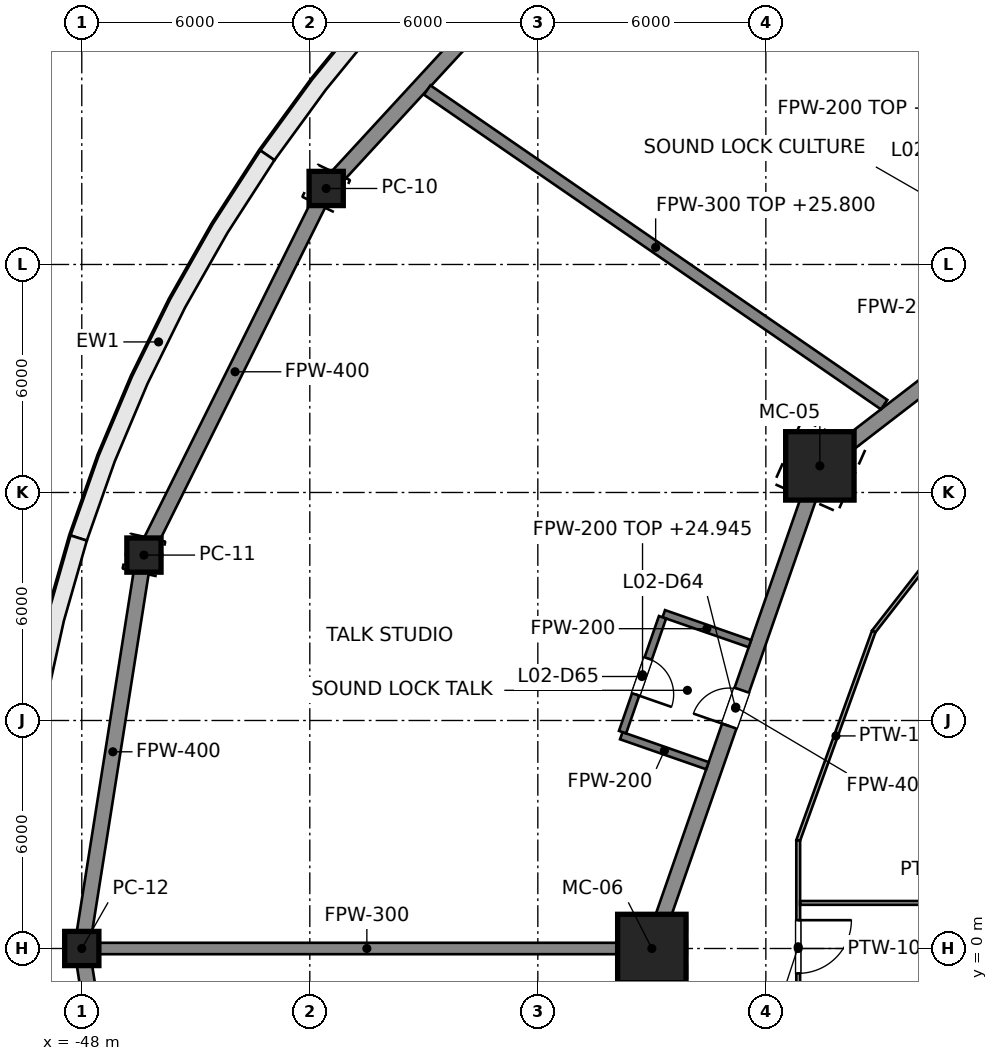
"""IFC4 building model, lengths in metres.
Left out: names, types, materials, properties, quantities, classifications, styles, units other than length and angle.
Written with IfcOpenShell. Run it as: python <this file> out.ifc"""

import sys

from ifc_helpers import new_model, si_unit, direction, frame, frame_2d, origin, origin_2d, place, context, subcontext, project, spatial, polyline, rectangle, hollow_rectangle, outline, extrude, element, fill, save


model = new_model("IFC4")
c1 = context("Model", 3, precision=1e-05, world=origin(), true_north=direction((0.0, 1.0)))
c2 = subcontext(c1, "Body", "Model", "MODEL_VIEW")
j1 = project(units=[si_unit("LENGTHUNIT", "METRE"), si_unit("PLANEANGLEUNIT", "RADIAN")], contexts=[c1])
p1 = place(None, origin())
s1 = spatial("IfcSite", under=j1, at=p1, CompositionType="ELEMENT")
p2 = place(p1, origin())
s2 = spatial("IfcBuilding", under=s1, at=p2, CompositionType="ELEMENT")
p3 = place(p2, frame((0.0, 0.0, 17.0)))
s3 = spatial("IfcBuildingStorey", under=s2, at=p3, CompositionType="ELEMENT", Elevation=17.0)
for number, where, z_axis, x_axis in (
    (1, (-28.579, 12.7, 0.0), (0.0, 0.0, 1.0), (-0.914, 0.406, 0.0)),
    (2, (-33.0, 0.0, 0.0), (0.0, 0.0, 1.0), (-1.0, 0.0, 0.0)),
):
    element("IfcColumn", number, at=place(p3, frame(where, z_axis=z_axis, x_axis=x_axis)), inside=s3, PredefinedType="COLUMN", context=c2, shape_type="SweptSolid", body=[
        extrude(hollow_rectangle(XDim=1.8, YDim=1.8, WallThickness=0.08, at=origin_2d()), origin(), (0.0, 0.0, 1.0), 9.0),
    ])
for number, where, z_axis, x_axis in (
    (3, (-41.569, 20.0, 0.0), (0.0, 0.0, 1.0), (-0.901, 0.434, 0.0)),
    (4, (-46.365, 10.353, 0.0), (0.0, 0.0, 1.0), (-0.976, 0.218, 0.0)),
    (5, (-48.0, 0.0, 0.0), (0.0, 0.0, 1.0), (-1.0, 0.0, 0.0)),
):
    element("IfcColumn", number, at=place(p3, frame(where, z_axis=z_axis, x_axis=x_axis)), inside=s3, PredefinedType="COLUMN", context=c2, shape_type="SweptSolid", body=[
        extrude(hollow_rectangle(XDim=0.9, YDim=0.9, WallThickness=0.04, at=origin_2d()), origin(), (0.0, 0.0, 1.0), 9.0),
    ])
p4 = place(p3, origin())
e6 = element("IfcWall", 6, at=p4, inside=s3, PredefinedType="SOLIDWALL", context=c2, shape_type="SweptSolid", body=[
    extrude(outline(polyline([(-35.355, 29.698), (-37.157, 28.104), (-38.857, 26.431), (-40.451, 24.687), (-41.934, 22.875), (-43.301, 21.0), (-42.93, 20.745), (-41.577, 22.6), (-40.11, 24.393), (-38.533, 26.119), (-36.85, 27.774), (-35.066, 29.354), (-35.355, 29.698)])), origin(), (0.0, 0.0, 1.0), 8.8),
])
e7 = element("IfcWall", 7, at=p4, inside=s3, PredefinedType="SOLIDWALL", context=c2, shape_type="SweptSolid", body=[
    extrude(outline(polyline([(-43.301, 21.0), (-44.55, 19.068), (-45.677, 17.083), (-46.679, 15.052), (-47.553, 12.979), (-48.296, 10.87), (-47.868, 10.734), (-47.133, 12.816), (-46.27, 14.865), (-45.28, 16.872), (-44.166, 18.834), (-42.93, 20.745), (-43.301, 21.0)])), origin(), (0.0, 0.0, 1.0), 8.8),
])
e8 = element("IfcWall", 8, at=p4, inside=s3, PredefinedType="SOLIDWALL", context=c2, shape_type="SweptSolid", body=[
    extrude(outline(polyline([(-48.296, 10.87), (-48.907, 8.732), (-49.385, 6.57), (-49.726, 4.39), (-49.931, 2.198), (-50.0, 0.0), (-49.55, 0.0), (-49.482, 2.17), (-49.28, 4.334), (-48.942, 6.487), (-48.471, 8.622), (-47.868, 10.734), (-48.296, 10.87)])), origin(), (0.0, 0.0, 1.0), 8.8),
])
e9 = element("IfcWall", 9, at=p4, inside=s3, PredefinedType="SOLIDWALL", context=c2, shape_type="SweptSolid", body=[
    extrude(outline(polyline([(-50.0, 0.0), (-49.931, -2.198), (-49.726, -4.39), (-49.385, -6.57), (-48.907, -8.732), (-48.296, -10.87), (-47.868, -10.734), (-48.471, -8.622), (-48.942, -6.487), (-49.28, -4.334), (-49.482, -2.17), (-49.55, 0.0), (-50.0, 0.0)])), origin(), (0.0, 0.0, 1.0), 8.8),
])
p5 = place(p3, frame((-33.941, 28.284, 0.0), z_axis=(0.0, 0.0, 1.0), x_axis=(-0.67736833065, -0.735644033914, 0.0)))
e10 = element("IfcWall", 10, at=p5, inside=s3, PredefinedType="PARTITIONING", context=c2, shape_type="SweptSolid", body=[
    extrude(rectangle(XDim=11.261, YDim=0.4, at=frame_2d((5.631, 0.0))), origin(), (0.0, 0.0, 1.0), 7.877),
])
p6 = place(p3, frame((-41.569, 20.0, 0.0), z_axis=(0.0, 0.0, 1.0), x_axis=(-0.445118441463, -0.895471704226, 0.0)))
e11 = element("IfcWall", 11, at=p6, inside=s3, PredefinedType="PARTITIONING", context=c2, shape_type="SweptSolid", body=[
    extrude(rectangle(XDim=10.773, YDim=0.4, at=frame_2d((5.387, 0.0))), origin(), (0.0, 0.0, 1.0), 7.877),
])
for number, where, z_axis, x_axis in (
    (12, (-46.365, 10.353, 0.0), (0.0, 0.0, 1.0), (-0.156, -0.988, 0.0)),
    (13, (-48.0, 0.0, 0.0), (0.0, 0.0, 1.0), (0.156, -0.988, 0.0)),
):
    element("IfcWall", number, at=place(p3, frame(where, z_axis=z_axis, x_axis=x_axis)), inside=s3, PredefinedType="PARTITIONING", context=c2, shape_type="SweptSolid", body=[
        extrude(rectangle(XDim=10.481, YDim=0.4, at=frame_2d((5.241, 0.0))), origin(), (0.0, 0.0, 1.0), 7.877),
    ])
p7 = place(p3, frame((-16.5, 21.997, 0.0), z_axis=(0.0, 0.0, 1.0), x_axis=(-0.792443539308, -0.609945273782, 0.0)))
e14 = element("IfcWall", 14, at=p7, inside=s3, PredefinedType="PARTITIONING", context=c2, shape_type="SweptSolid", body=[
    extrude(rectangle(XDim=15.242, YDim=0.4, at=frame_2d((7.621, 0.0))), origin(), (0.0, 0.0, 1.0), 7.868),
])
p8 = place(p7, frame((7.15, 0.0, 0.0)))
e15 = element("IfcOpeningElement", 15, at=p8, cuts=e14, PredefinedType="OPENING", context=c2, shape_type="SweptSolid", body=[
    extrude(rectangle(XDim=1.0, YDim=2.1, at=frame_2d((0.5, 1.05))), frame((0.0, 0.2, 0.0), z_axis=(0.0, -1.0, 0.0), x_axis=(1.0, 0.0, 0.0)), (0.0, 0.0, 1.0), 0.4),
])
p9 = place(p3, frame((-28.579, 12.7, 0.0), z_axis=(0.0, 0.0, 1.0), x_axis=(-0.328770590399, -0.944409815117, 0.0)))
e16 = element("IfcWall", 16, at=p9, inside=s3, PredefinedType="PARTITIONING", context=c2, shape_type="SweptSolid", body=[
    extrude(rectangle(XDim=13.448, YDim=0.4, at=frame_2d((6.724, 0.0))), origin(), (0.0, 0.0, 1.0), 7.868),
])
p10 = place(p9, frame((6.25, 0.0, 0.0)))
e17 = element("IfcOpeningElement", 17, at=p10, cuts=e16, PredefinedType="OPENING", context=c2, shape_type="SweptSolid", body=[
    extrude(rectangle(XDim=1.0, YDim=2.1, at=frame_2d((0.5, 1.05))), frame((0.0, 0.2, 0.0), z_axis=(0.0, -1.0, 0.0), x_axis=(1.0, 0.0, 0.0)), (0.0, 0.0, 1.0), 0.4),
])
p11 = place(p3, frame((-33.0, 0.0, 0.0), z_axis=(0.0, 0.0, 1.0), x_axis=(0.328770590399, -0.944409815117, 0.0)))
e18 = element("IfcWall", 18, at=p11, inside=s3, PredefinedType="PARTITIONING", context=c2, shape_type="SweptSolid", body=[
    extrude(rectangle(XDim=13.448, YDim=0.4, at=frame_2d((6.724, 0.0))), origin(), (0.0, 0.0, 1.0), 7.868),
])
p12 = place(p11, frame((6.25, 0.0, 0.0)))
e19 = element("IfcOpeningElement", 19, at=p12, cuts=e18, PredefinedType="OPENING", context=c2, shape_type="SweptSolid", body=[
    extrude(rectangle(XDim=1.0, YDim=2.1, at=frame_2d((0.5, 1.05))), frame((0.0, 0.2, 0.0), z_axis=(0.0, -1.0, 0.0), x_axis=(1.0, 0.0, 0.0)), (0.0, 0.0, 1.0), 0.4),
])
p13 = place(p3, frame((-23.325, 13.271, 0.0), z_axis=(0.0, 0.0, 1.0), x_axis=(-0.614354540541, -0.78903009988, 0.0)))
e20 = element("IfcWall", 20, at=p13, inside=s3, PredefinedType="PARTITIONING", context=c2, shape_type="SweptSolid", body=[
    extrude(rectangle(XDim=6.246, YDim=0.1, at=frame_2d((3.123, 0.0))), origin(), (0.0, 0.0, 1.0), 7.945),
])
p14 = place(p3, frame((-27.162, 8.343, 0.0), z_axis=(0.0, 0.0, 1.0), x_axis=(-0.339837423604, -0.940484197378, 0.0)))
e21 = element("IfcWall", 21, at=p14, inside=s3, PredefinedType="PARTITIONING", context=c2, shape_type="SweptSolid", body=[
    extrude(rectangle(XDim=5.845, YDim=0.1, at=frame_2d((2.922, 0.0))), origin(), (0.0, 0.0, 1.0), 7.877),
])
p15 = place(p3, frame((-29.148, 2.845, 0.0), z_axis=(0.0, 0.0, 1.0), x_axis=(0.0, -1.0, 0.0)))
e22 = element("IfcWall", 22, at=p15, inside=s3, PredefinedType="PARTITIONING", context=c2, shape_type="SweptSolid", body=[
    extrude(rectangle(XDim=5.691, YDim=0.1, at=frame_2d((2.845, 0.0))), origin(), (0.0, 0.0, 1.0), 7.877),
])
p16 = place(p15, frame((2.1, 0.0, 0.0)))
e23 = element("IfcOpeningElement", 23, at=p16, cuts=e22, PredefinedType="OPENING", context=c2, shape_type="SweptSolid", body=[
    extrude(rectangle(XDim=1.4, YDim=2.1, at=frame_2d((0.7, 1.05))), frame((0.0, 0.05, 0.0), z_axis=(0.0, -1.0, 0.0), x_axis=(1.0, 0.0, 0.0)), (0.0, 0.0, 1.0), 0.1),
])
p17 = place(p3, frame((-18.05, 1.2, 0.0), z_axis=(0.0, 0.0, 1.0), x_axis=(-1.0, 0.0, 0.0)))
e24 = element("IfcWall", 24, at=p17, inside=s3, PredefinedType="PARTITIONING", context=c2, shape_type="SweptSolid", body=[
    extrude(rectangle(XDim=11.048, YDim=0.1, at=frame_2d((5.524, 0.0))), origin(), (0.0, 0.0, 1.0), 8.8),
])
p18 = place(p3, frame((-26.888, 14.312, 0.0), z_axis=(0.0, 0.0, 1.0), x_axis=(-0.823646474485, 0.567103592889, 0.0)))
e25 = element("IfcWall", 25, at=p18, inside=s3, PredefinedType="PARTITIONING", context=c2, shape_type="SweptSolid", body=[
    extrude(rectangle(XDim=14.598, YDim=0.3, at=frame_2d((7.299, 0.0))), origin(), (0.0, 0.0, 1.0), 8.8),
])
p19 = place(p3, frame((-33.2, 0.0, 0.0), z_axis=(0.0, 0.0, 1.0), x_axis=(-1.0, 0.0, 0.0)))
e26 = element("IfcWall", 26, at=p19, inside=s3, PredefinedType="PARTITIONING", context=c2, shape_type="SweptSolid", body=[
    extrude(rectangle(XDim=14.598, YDim=0.3, at=frame_2d((7.299, 0.0))), origin(), (0.0, 0.0, 1.0), 8.026),
])
for number, where, z_axis, x_axis in (
    (27, (-30.419, 8.021, 0.0), (0.0, 0.0, 1.0), (-0.944, 0.329, 0.0)),
    (28, (-31.537, 4.81, 0.0), (0.0, 0.0, 1.0), (-0.944, 0.329, 0.0)),
):
    element("IfcWall", number, at=place(p3, frame(where, z_axis=z_axis, x_axis=x_axis)), inside=s3, PredefinedType="PARTITIONING", context=c2, shape_type="SweptSolid", body=[
        extrude(rectangle(XDim=2.4, YDim=0.2, at=frame_2d((1.2, 0.0))), origin(), (0.0, 0.0, 1.0), 8.8),
    ])
p20 = place(p3, frame((-32.719, 8.716, 0.0), z_axis=(0.0, 0.0, 1.0), x_axis=(-0.328742544754, -0.944419577978, 0.0)))
e29 = element("IfcWall", 29, at=p20, inside=s3, PredefinedType="PARTITIONING", context=c2, shape_type="SweptSolid", body=[
    extrude(rectangle(XDim=3.2, YDim=0.2, at=frame_2d((1.6, 0.0))), origin(), (0.0, 0.0, 1.0), 7.945),
])
p21 = place(p20, frame((1.15, 0.0, 0.0)))
e30 = element("IfcOpeningElement", 30, at=p21, cuts=e29, PredefinedType="OPENING", context=c2, shape_type="SweptSolid", body=[
    extrude(rectangle(XDim=1.0, YDim=2.1, at=frame_2d((0.5, 1.05))), frame((0.0, 0.1, 0.0), z_axis=(0.0, -1.0, 0.0), x_axis=(1.0, 0.0, 0.0)), (0.0, 0.0, 1.0), 0.2),
])
p22 = place(p16, origin())
e31 = element("IfcDoor", 31, at=p22, inside=s3, OperationType="SINGLE_SWING_LEFT", PredefinedType="DOOR", context=c2, shape_type="SweptSolid", body=[
    extrude(rectangle(XDim=1.4, YDim=2.1, at=frame_2d((0.7, 1.05))), frame((0.0, 0.025, 0.0), z_axis=(0.0, -1.0, 0.0), x_axis=(1.0, 0.0, 0.0)), (0.0, 0.0, 1.0), 0.05),
])
fill(e23, e31)
p23 = place(p10, origin())
e32 = element("IfcDoor", 32, at=p23, inside=s3, OperationType="SINGLE_SWING_RIGHT", PredefinedType="DOOR", context=c2, shape_type="SweptSolid", body=[
    extrude(rectangle(XDim=1.0, YDim=2.1, at=frame_2d((0.5, 1.05))), frame((0.0, 0.025, 0.0), z_axis=(0.0, -1.0, 0.0), x_axis=(1.0, 0.0, 0.0)), (0.0, 0.0, 1.0), 0.05),
])
fill(e17, e32)
p24 = place(p21, origin())
e33 = element("IfcDoor", 33, at=p24, inside=s3, OperationType="SINGLE_SWING_RIGHT", PredefinedType="DOOR", context=c2, shape_type="SweptSolid", body=[
    extrude(rectangle(XDim=1.0, YDim=2.1, at=frame_2d((0.5, 1.05))), frame((0.0, 0.025, 0.0), z_axis=(0.0, -1.0, 0.0), x_axis=(1.0, 0.0, 0.0)), (0.0, 0.0, 1.0), 0.05),
])
fill(e30, e33)
save(model, sys.argv[1])
